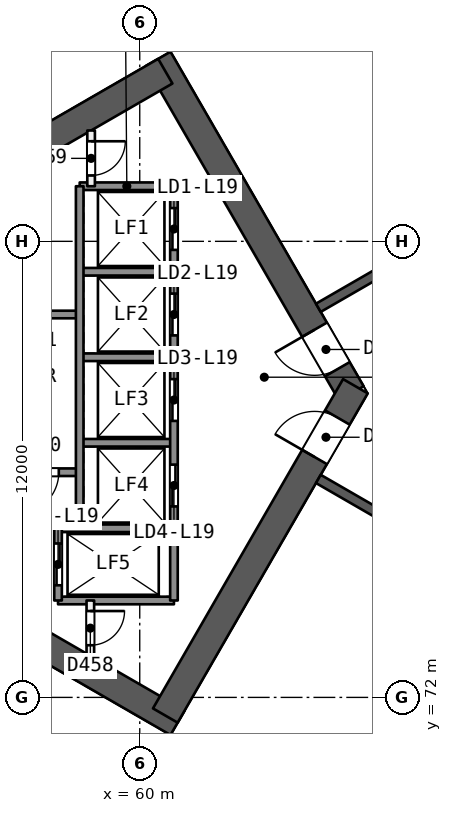
"""IFC4 building model, lengths in metres.
Left out: names, types, materials, properties, quantities, classifications, styles, units other than length and angle.
Written with IfcOpenShell. Run it as: python <this file> out.ifc"""

import sys

from ifc_helpers import new_model, si_unit, direction, frame, frame_2d, origin, place, context, subcontext, project, spatial, rectangle, extrude, element, fill, save


model = new_model("IFC4")
c1 = context("Model", 3, precision=1e-05, world=origin(), true_north=direction((0.0, 1.0)))
c2 = subcontext(c1, "Body", "Model", "MODEL_VIEW")
j1 = project(units=[si_unit("LENGTHUNIT", "METRE"), si_unit("PLANEANGLEUNIT", "RADIAN")], contexts=[c1])
p1 = place(None, origin())
s1 = spatial("IfcSite", under=j1, at=p1, CompositionType="ELEMENT")
p2 = place(p1, origin())
s2 = spatial("IfcBuilding", under=s1, at=p2, CompositionType="ELEMENT")
p3 = place(p2, frame((0.0, 0.0, 83.2)))
s3 = spatial("IfcBuildingStorey", under=s2, at=p3, CompositionType="ELEMENT", Elevation=83.2)
p4 = place(p3, frame((65.567, 80.0, 0.0), z_axis=(0.0, 0.0, 1.0), x_axis=(-0.499988615364, 0.866031976607, 0.0)))
e1 = element("IfcWall", 1, at=p4, inside=s3, PredefinedType="SHEAR", context=c2, shape_type="SweptSolid", body=[
    extrude(rectangle(XDim=10.163, YDim=0.75, at=frame_2d((5.082, 0.0))), origin(), (0.0, 0.0, 1.0), 3.7),
])
p5 = place(p4, frame((0.733, 0.0, 0.0)))
e2 = element("IfcOpeningElement", 2, at=p5, cuts=e1, PredefinedType="OPENING", context=c2, shape_type="SweptSolid", body=[
    extrude(rectangle(XDim=1.2, YDim=2.1, at=frame_2d((0.6, 1.05))), frame((0.0, 0.385, 0.0), z_axis=(0.0, -1.0, 0.0), x_axis=(1.0, 0.0, 0.0)), (0.0, 0.0, 1.0), 0.771),
])
p6 = place(p3, frame((60.673, 88.477, 0.0), z_axis=(0.0, 0.0, 1.0), x_axis=(-0.8660248072, -0.500001033313, 0.0)))
e3 = element("IfcWall", 3, at=p6, inside=s3, PredefinedType="SHEAR", context=c2, shape_type="SweptSolid", body=[
    extrude(rectangle(XDim=13.958, YDim=0.75, at=frame_2d((6.979, 0.0))), origin(), (0.0, 0.0, 1.0), 3.7),
])
p7 = place(p3, frame((48.772, 78.394, 0.0), z_axis=(0.0, 0.0, 1.0), x_axis=(0.866028339916, -0.499994914436, 0.0)))
e4 = element("IfcWall", 4, at=p7, inside=s3, PredefinedType="SHEAR", context=c2, shape_type="SweptSolid", body=[
    extrude(rectangle(XDim=14.117, YDim=0.75, at=frame_2d((7.059, 0.0))), origin(), (0.0, 0.0, 1.0), 3.7),
])
p8 = place(p3, frame((60.673, 71.523, 0.0), z_axis=(0.0, 0.0, 1.0), x_axis=(0.499997052475, 0.866027105532, 0.0)))
e5 = element("IfcWall", 5, at=p8, inside=s3, PredefinedType="SHEAR", context=c2, shape_type="SweptSolid", body=[
    extrude(rectangle(XDim=10.005, YDim=0.75, at=frame_2d((5.002, 0.0))), origin(), (0.0, 0.0, 1.0), 3.7),
])
p9 = place(p8, frame((7.855, 0.0, 0.0)))
e6 = element("IfcOpeningElement", 6, at=p9, cuts=e5, PredefinedType="OPENING", context=c2, shape_type="SweptSolid", body=[
    extrude(rectangle(XDim=1.2, YDim=2.1, at=frame_2d((0.6, 1.05))), frame((0.0, 0.385, 0.0), z_axis=(0.0, -1.0, 0.0), x_axis=(1.0, 0.0, 0.0)), (0.0, 0.0, 1.0), 0.771),
])
p10 = place(p3, frame((78.2, 90.046, 0.0), z_axis=(0.0, 0.0, 1.0), x_axis=(-0.866026492143, -0.499998114903, 0.0)))
e7 = element("IfcWall", 7, at=p10, inside=s3, PredefinedType="SHEAR", context=c2, shape_type="SweptSolid", body=[
    extrude(rectangle(XDim=15.588, YDim=0.25, at=frame_2d((7.794, 0.0))), origin(), (0.0, 0.0, 1.0), 3.2),
])
p11 = place(p10, frame((1.527, 0.0, 0.0)))
e8 = element("IfcOpeningElement", 8, at=p11, cuts=e7, PredefinedType="OPENING", context=c2, shape_type="SweptSolid", body=[
    extrude(rectangle(XDim=1.0, YDim=2.1, at=frame_2d((0.5, 1.05))), frame((0.0, 0.135, 0.0), z_axis=(0.0, -1.0, 0.0), x_axis=(1.0, 0.0, 0.0)), (0.0, 0.0, 1.0), 0.271),
])
p12 = place(p10, frame((8.227, 0.0, 0.0)))
e9 = element("IfcOpeningElement", 9, at=p12, cuts=e7, PredefinedType="OPENING", context=c2, shape_type="SweptSolid", body=[
    extrude(rectangle(XDim=1.1, YDim=2.1, at=frame_2d((0.55, 1.05))), frame((0.0, 0.135, 0.0), z_axis=(0.0, -1.0, 0.0), x_axis=(1.0, 0.0, 0.0)), (0.0, 0.0, 1.0), 0.271),
])
p13 = place(p10, frame((12.594, 0.0, 0.0)))
e10 = element("IfcOpeningElement", 10, at=p13, cuts=e7, PredefinedType="OPENING", context=c2, shape_type="SweptSolid", body=[
    extrude(rectangle(XDim=1.0, YDim=2.1, at=frame_2d((0.5, 1.05))), frame((0.0, 0.135, 0.0), z_axis=(0.0, -1.0, 0.0), x_axis=(1.0, 0.0, 0.0)), (0.0, 0.0, 1.0), 0.271),
])
p14 = place(p3, frame((64.7, 77.748, 0.0), z_axis=(0.0, 0.0, 1.0), x_axis=(0.866026492143, -0.499998114903, 0.0)))
e11 = element("IfcWall", 11, at=p14, inside=s3, PredefinedType="SHEAR", context=c2, shape_type="SweptSolid", body=[
    extrude(rectangle(XDim=15.588, YDim=0.25, at=frame_2d((7.794, 0.0))), origin(), (0.0, 0.0, 1.0), 3.2),
])
p15 = place(p14, frame((3.397, 0.0, 0.0)))
e12 = element("IfcOpeningElement", 12, at=p15, cuts=e11, PredefinedType="OPENING", context=c2, shape_type="SweptSolid", body=[
    extrude(rectangle(XDim=1.0, YDim=2.1, at=frame_2d((0.5, 1.05))), frame((0.0, 0.135, 0.0), z_axis=(0.0, -1.0, 0.0), x_axis=(1.0, 0.0, 0.0)), (0.0, 0.0, 1.0), 0.271),
])
p16 = place(p14, frame((9.091, 0.0, 0.0)))
e13 = element("IfcOpeningElement", 13, at=p16, cuts=e11, PredefinedType="OPENING", context=c2, shape_type="SweptSolid", body=[
    extrude(rectangle(XDim=1.0, YDim=2.1, at=frame_2d((0.5, 1.05))), frame((0.0, 0.135, 0.0), z_axis=(0.0, -1.0, 0.0), x_axis=(1.0, 0.0, 0.0)), (0.0, 0.0, 1.0), 0.271),
])
for number, where, z_axis, x_axis in (
    (14, (62.432, 96.157, 0.0), (0.0, 0.0, 1.0), (0.5, -0.866, 0.0)),
    (15, (64.862, 62.44, 0.0), (0.0, 0.0, 1.0), (0.5, 0.866, 0.0)),
):
    element("IfcWall", number, at=place(p3, frame(where, z_axis=z_axis, x_axis=x_axis)), inside=s3, PredefinedType="PARTITIONING", context=c2, shape_type="SweptSolid", body=[
        extrude(rectangle(XDim=13.177, YDim=0.2, at=frame_2d((6.588, 0.0))), origin(), (0.0, 0.0, 1.0), 3.2),
    ])
p17 = place(p3, frame((39.353, 83.005, 0.0), z_axis=(0.0, 0.0, 1.0), x_axis=(0.866025832118, 0.499999258104, 0.0)))
e16 = element("IfcWall", 16, at=p17, inside=s3, PredefinedType="SOLIDWALL", context=c2, shape_type="SweptSolid", body=[
    extrude(rectangle(XDim=58.737, YDim=0.3, at=frame_2d((29.368, 0.0))), origin(), (0.0, 0.0, 1.0), 3.2),
])
p18 = place(p17, frame((28.636, 0.0, 0.0)))
e17 = element("IfcOpeningElement", 17, at=p18, cuts=e16, PredefinedType="OPENING", context=c2, shape_type="SweptSolid", body=[
    extrude(rectangle(XDim=2.4, YDim=2.4, at=frame_2d((1.2, 1.2))), frame((0.0, 0.161, 0.0), z_axis=(0.0, -1.0, 0.0), x_axis=(1.0, 0.0, 0.0)), (0.0, 0.0, 1.0), 0.321),
])
p19 = place(p17, frame((33.936, 0.0, 0.0)))
e18 = element("IfcOpeningElement", 18, at=p19, cuts=e16, PredefinedType="OPENING", context=c2, shape_type="SweptSolid", body=[
    extrude(rectangle(XDim=2.4, YDim=2.4, at=frame_2d((1.2, 1.2))), frame((0.0, 0.161, 0.0), z_axis=(0.0, -1.0, 0.0), x_axis=(1.0, 0.0, 0.0)), (0.0, 0.0, 1.0), 0.321),
])
p20 = place(p17, frame((45.575, 0.0, 0.0)))
e19 = element("IfcOpeningElement", 19, at=p20, cuts=e16, PredefinedType="OPENING", context=c2, shape_type="SweptSolid", body=[
    extrude(rectangle(XDim=2.4, YDim=2.4, at=frame_2d((1.2, 1.2))), frame((0.0, 0.161, 0.0), z_axis=(0.0, -1.0, 0.0), x_axis=(1.0, 0.0, 0.0)), (0.0, 0.0, 1.0), 0.321),
])
p21 = place(p17, frame((22.868, 0.0, 0.0)))
e20 = element("IfcOpeningElement", 20, at=p21, cuts=e16, PredefinedType="OPENING", context=c2, shape_type="SweptSolid", body=[
    extrude(rectangle(XDim=2.4, YDim=2.4, at=frame_2d((1.2, 1.2))), frame((0.0, 0.161, 0.0), z_axis=(0.0, -1.0, 0.0), x_axis=(1.0, 0.0, 0.0)), (0.0, 0.0, 1.0), 0.321),
])
p22 = place(p17, frame((10.765, 0.0, 0.0)))
e21 = element("IfcOpeningElement", 21, at=p22, cuts=e16, PredefinedType="OPENING", context=c2, shape_type="SweptSolid", body=[
    extrude(rectangle(XDim=2.4, YDim=2.4, at=frame_2d((1.2, 1.2))), frame((0.0, 0.161, 0.0), z_axis=(0.0, -1.0, 0.0), x_axis=(1.0, 0.0, 0.0)), (0.0, 0.0, 1.0), 0.321),
])
p23 = place(p3, frame((90.221, 47.626, 0.0), z_axis=(0.0, 0.0, 1.0), x_axis=(-0.866025832118, 0.499999258104, 0.0)))
e22 = element("IfcWall", 22, at=p23, inside=s3, PredefinedType="SOLIDWALL", context=c2, shape_type="SweptSolid", body=[
    extrude(rectangle(XDim=58.737, YDim=0.3, at=frame_2d((29.368, 0.0))), origin(), (0.0, 0.0, 1.0), 3.2),
])
p24 = place(p23, frame((32.065, 0.0, 0.0)))
e23 = element("IfcOpeningElement", 23, at=p24, cuts=e22, PredefinedType="OPENING", context=c2, shape_type="SweptSolid", body=[
    extrude(rectangle(XDim=2.4, YDim=2.4, at=frame_2d((1.2, 1.2))), frame((0.0, 0.161, 0.0), z_axis=(0.0, -1.0, 0.0), x_axis=(1.0, 0.0, 0.0)), (0.0, 0.0, 1.0), 0.321),
])
p25 = place(p23, frame((45.575, 0.0, 0.0)))
e24 = element("IfcOpeningElement", 24, at=p25, cuts=e22, PredefinedType="OPENING", context=c2, shape_type="SweptSolid", body=[
    extrude(rectangle(XDim=2.4, YDim=2.4, at=frame_2d((1.2, 1.2))), frame((0.0, 0.161, 0.0), z_axis=(0.0, -1.0, 0.0), x_axis=(1.0, 0.0, 0.0)), (0.0, 0.0, 1.0), 0.321),
])
p26 = place(p23, frame((13.441, 0.0, 0.0)))
e25 = element("IfcOpeningElement", 25, at=p26, cuts=e22, PredefinedType="OPENING", context=c2, shape_type="SweptSolid", body=[
    extrude(rectangle(XDim=2.4, YDim=2.4, at=frame_2d((1.2, 1.2))), frame((0.0, 0.161, 0.0), z_axis=(0.0, -1.0, 0.0), x_axis=(1.0, 0.0, 0.0)), (0.0, 0.0, 1.0), 0.321),
])
for number, where, z_axis, x_axis in (
    (26, (60.9, 85.45, 0.0), (0.0, 0.0, 1.0), (-1.0, 0.0, 0.0)),
    (27, (60.9, 83.2, 0.0), (0.0, 0.0, 1.0), (-1.0, 0.0, 0.0)),
):
    element("IfcWall", number, at=place(p3, frame(where, z_axis=z_axis, x_axis=x_axis)), inside=s3, PredefinedType="SOLIDWALL", context=c2, shape_type="SweptSolid", body=[
        extrude(rectangle(XDim=2.48, YDim=0.2, at=frame_2d((1.24, 0.0))), origin(), (0.0, 0.0, 1.0), 3.2),
    ])
p27 = place(p3, frame((58.42, 82.075, 0.0), z_axis=(0.0, 0.0, 1.0), x_axis=(-1.0, 0.0, 0.0)))
e28 = element("IfcWall", 28, at=p27, inside=s3, PredefinedType="SOLIDWALL", context=c2, shape_type="SweptSolid", body=[
    extrude(rectangle(XDim=7.7, YDim=0.2, at=frame_2d((3.85, 0.0))), origin(), (0.0, 0.0, 1.0), 3.2),
])
for number, where, z_axis, x_axis in (
    (29, (60.9, 80.95, 0.0), (0.0, 0.0, 1.0), (-1.0, 0.0, 0.0)),
    (30, (60.9, 78.7, 0.0), (0.0, 0.0, 1.0), (-1.0, 0.0, 0.0)),
):
    element("IfcWall", number, at=place(p3, frame(where, z_axis=z_axis, x_axis=x_axis)), inside=s3, PredefinedType="SOLIDWALL", context=c2, shape_type="SweptSolid", body=[
        extrude(rectangle(XDim=2.48, YDim=0.2, at=frame_2d((1.24, 0.0))), origin(), (0.0, 0.0, 1.0), 3.2),
    ])
p28 = place(p3, frame((58.42, 77.925, 0.0), z_axis=(0.0, 0.0, 1.0), x_axis=(-1.0, 0.0, 0.0)))
e31 = element("IfcWall", 31, at=p28, inside=s3, PredefinedType="SOLIDWALL", context=c2, shape_type="SweptSolid", body=[
    extrude(rectangle(XDim=7.7, YDim=0.2, at=frame_2d((3.85, 0.0))), origin(), (0.0, 0.0, 1.0), 3.2),
])
p29 = place(p28, frame((0.55, 0.0, 0.0)))
e32 = element("IfcOpeningElement", 32, at=p29, cuts=e31, PredefinedType="OPENING", context=c2, shape_type="SweptSolid", body=[
    extrude(rectangle(XDim=1.1, YDim=2.1, at=frame_2d((0.55, 1.05))), frame((0.0, 0.11, 0.0), z_axis=(0.0, -1.0, 0.0), x_axis=(1.0, 0.0, 0.0)), (0.0, 0.0, 1.0), 0.221),
])
for number, where, z_axis, x_axis in (
    (33, (60.9, 76.45, 0.0), (0.0, 0.0, 1.0), (-1.0, 0.0, 0.0)),
    (34, (60.9, 74.55, 0.0), (0.0, 0.0, 1.0), (-1.0, 0.0, 0.0)),
):
    element("IfcWall", number, at=place(p3, frame(where, z_axis=z_axis, x_axis=x_axis)), inside=s3, PredefinedType="SOLIDWALL", context=c2, shape_type="SweptSolid", body=[
        extrude(rectangle(XDim=3.05, YDim=0.2, at=frame_2d((1.525, 0.0))), origin(), (0.0, 0.0, 1.0), 3.2),
    ])
p30 = place(p3, frame((60.9, 85.45, 0.0), z_axis=(0.0, 0.0, 1.0), x_axis=(0.0, -1.0, 0.0)))
e35 = element("IfcWall", 35, at=p30, inside=s3, PredefinedType="SOLIDWALL", context=c2, shape_type="SweptSolid", body=[
    extrude(rectangle(XDim=10.9, YDim=0.2, at=frame_2d((5.45, 0.0))), origin(), (0.0, 0.0, 1.0), 3.2),
])
p31 = place(p30, frame((0.575, 0.0, 0.0)))
e36 = element("IfcOpeningElement", 36, at=p31, cuts=e35, PredefinedType="OPENING", context=c2, shape_type="SweptSolid", body=[
    extrude(rectangle(XDim=1.1, YDim=2.1, at=frame_2d((0.55, 1.05))), frame((0.0, 0.11, 0.0), z_axis=(0.0, -1.0, 0.0), x_axis=(1.0, 0.0, 0.0)), (0.0, 0.0, 1.0), 0.221),
])
p32 = place(p30, frame((2.825, 0.0, 0.0)))
e37 = element("IfcOpeningElement", 37, at=p32, cuts=e35, PredefinedType="OPENING", context=c2, shape_type="SweptSolid", body=[
    extrude(rectangle(XDim=1.1, YDim=2.1, at=frame_2d((0.55, 1.05))), frame((0.0, 0.11, 0.0), z_axis=(0.0, -1.0, 0.0), x_axis=(1.0, 0.0, 0.0)), (0.0, 0.0, 1.0), 0.221),
])
p33 = place(p30, frame((5.075, 0.0, 0.0)))
e38 = element("IfcOpeningElement", 38, at=p33, cuts=e35, PredefinedType="OPENING", context=c2, shape_type="SweptSolid", body=[
    extrude(rectangle(XDim=1.1, YDim=2.1, at=frame_2d((0.55, 1.05))), frame((0.0, 0.11, 0.0), z_axis=(0.0, -1.0, 0.0), x_axis=(1.0, 0.0, 0.0)), (0.0, 0.0, 1.0), 0.221),
])
p34 = place(p30, frame((7.325, 0.0, 0.0)))
e39 = element("IfcOpeningElement", 39, at=p34, cuts=e35, PredefinedType="OPENING", context=c2, shape_type="SweptSolid", body=[
    extrude(rectangle(XDim=1.1, YDim=2.1, at=frame_2d((0.55, 1.05))), frame((0.0, 0.11, 0.0), z_axis=(0.0, -1.0, 0.0), x_axis=(1.0, 0.0, 0.0)), (0.0, 0.0, 1.0), 0.221),
])
p35 = place(p3, frame((58.72, 86.917, 0.0), z_axis=(0.0, 0.0, 1.0), x_axis=(0.0, -1.0, 0.0)))
e40 = element("IfcWall", 40, at=p35, inside=s3, PredefinedType="PARTITIONING", context=c2, shape_type="SweptSolid", body=[
    extrude(rectangle(XDim=1.467, YDim=0.2, at=frame_2d((0.733, 0.0))), origin(), (0.0, 0.0, 1.0), 3.2),
])
p36 = place(p35, frame((0.283, 0.0, 0.0)))
e41 = element("IfcOpeningElement", 41, at=p36, cuts=e40, PredefinedType="OPENING", context=c2, shape_type="SweptSolid", body=[
    extrude(rectangle(XDim=0.9, YDim=2.1, at=frame_2d((0.45, 1.05))), frame((0.0, 0.11, 0.0), z_axis=(0.0, -1.0, 0.0), x_axis=(1.0, 0.0, 0.0)), (0.0, 0.0, 1.0), 0.221),
])
p37 = place(p3, frame((58.7, 74.55, 0.0), z_axis=(0.0, 0.0, 1.0), x_axis=(0.0, -1.0, 0.0)))
e42 = element("IfcWall", 42, at=p37, inside=s3, PredefinedType="PARTITIONING", context=c2, shape_type="SweptSolid", body=[
    extrude(rectangle(XDim=1.455, YDim=0.2, at=frame_2d((0.728, 0.0))), origin(), (0.0, 0.0, 1.0), 3.2),
])
p38 = place(p37, frame((0.278, 0.0, 0.0)))
e43 = element("IfcOpeningElement", 43, at=p38, cuts=e42, PredefinedType="OPENING", context=c2, shape_type="SweptSolid", body=[
    extrude(rectangle(XDim=0.9, YDim=2.1, at=frame_2d((0.45, 1.05))), frame((0.0, 0.11, 0.0), z_axis=(0.0, -1.0, 0.0), x_axis=(1.0, 0.0, 0.0)), (0.0, 0.0, 1.0), 0.221),
])
p39 = place(p3, frame((58.42, 85.45, 0.0), z_axis=(0.0, 0.0, 1.0), x_axis=(0.0, -1.0, 0.0)))
e44 = element("IfcWall", 44, at=p39, inside=s3, PredefinedType="SOLIDWALL", context=c2, shape_type="SweptSolid", body=[
    extrude(rectangle(XDim=9.0, YDim=0.2, at=frame_2d((4.5, 0.0))), origin(), (0.0, 0.0, 1.0), 3.2),
])
p40 = place(p3, frame((57.85, 76.45, 0.0), z_axis=(0.0, 0.0, 1.0), x_axis=(0.0, -1.0, 0.0)))
e45 = element("IfcWall", 45, at=p40, inside=s3, PredefinedType="SOLIDWALL", context=c2, shape_type="SweptSolid", body=[
    extrude(rectangle(XDim=1.9, YDim=0.2, at=frame_2d((0.95, 0.0))), origin(), (0.0, 0.0, 1.0), 3.2),
])
p41 = place(p40, frame((0.4, 0.0, 0.0)))
e46 = element("IfcOpeningElement", 46, at=p41, cuts=e45, PredefinedType="OPENING", context=c2, shape_type="SweptSolid", body=[
    extrude(rectangle(XDim=1.1, YDim=2.1, at=frame_2d((0.55, 1.05))), frame((0.0, 0.11, 0.0), z_axis=(0.0, -1.0, 0.0), x_axis=(1.0, 0.0, 0.0)), (0.0, 0.0, 1.0), 0.221),
])
p42 = place(p5, origin())
e47 = element("IfcDoor", 47, at=p42, inside=s3, OperationType="SINGLE_SWING_RIGHT", PredefinedType="NOTDEFINED", context=c2, shape_type="SweptSolid", body=[
    extrude(rectangle(XDim=1.2, YDim=2.1, at=frame_2d((0.6, 1.05))), frame((0.0, 0.025, 0.0), z_axis=(0.0, -1.0, 0.0), x_axis=(1.0, 0.0, 0.0)), (0.0, 0.0, 1.0), 0.05),
])
fill(e2, e47)
p43 = place(p9, origin())
e48 = element("IfcDoor", 48, at=p43, inside=s3, OperationType="SINGLE_SWING_LEFT", PredefinedType="NOTDEFINED", context=c2, shape_type="SweptSolid", body=[
    extrude(rectangle(XDim=1.2, YDim=2.1, at=frame_2d((0.6, 1.05))), frame((0.0, 0.025, 0.0), z_axis=(0.0, -1.0, 0.0), x_axis=(1.0, 0.0, 0.0)), (0.0, 0.0, 1.0), 0.05),
])
fill(e6, e48)
p44 = place(p31, origin())
e49 = element("IfcDoor", 49, at=p44, inside=s3, OperationType="SLIDING_TO_RIGHT", PredefinedType="NOTDEFINED", context=c2, shape_type="SweptSolid", body=[
    extrude(rectangle(XDim=1.1, YDim=2.1, at=frame_2d((0.55, 1.05))), frame((0.0, 0.025, 0.0), z_axis=(0.0, -1.0, 0.0), x_axis=(1.0, 0.0, 0.0)), (0.0, 0.0, 1.0), 0.05),
])
fill(e36, e49)
p45 = place(p32, origin())
e50 = element("IfcDoor", 50, at=p45, inside=s3, OperationType="SLIDING_TO_LEFT", PredefinedType="NOTDEFINED", context=c2, shape_type="SweptSolid", body=[
    extrude(rectangle(XDim=1.1, YDim=2.1, at=frame_2d((0.55, 1.05))), frame((0.0, 0.025, 0.0), z_axis=(0.0, -1.0, 0.0), x_axis=(1.0, 0.0, 0.0)), (0.0, 0.0, 1.0), 0.05),
])
fill(e37, e50)
p46 = place(p33, origin())
e51 = element("IfcDoor", 51, at=p46, inside=s3, OperationType="SLIDING_TO_RIGHT", PredefinedType="NOTDEFINED", context=c2, shape_type="SweptSolid", body=[
    extrude(rectangle(XDim=1.1, YDim=2.1, at=frame_2d((0.55, 1.05))), frame((0.0, 0.025, 0.0), z_axis=(0.0, -1.0, 0.0), x_axis=(1.0, 0.0, 0.0)), (0.0, 0.0, 1.0), 0.05),
])
fill(e38, e51)
p47 = place(p34, origin())
e52 = element("IfcDoor", 52, at=p47, inside=s3, OperationType="SLIDING_TO_LEFT", PredefinedType="NOTDEFINED", context=c2, shape_type="SweptSolid", body=[
    extrude(rectangle(XDim=1.1, YDim=2.1, at=frame_2d((0.55, 1.05))), frame((0.0, 0.025, 0.0), z_axis=(0.0, -1.0, 0.0), x_axis=(1.0, 0.0, 0.0)), (0.0, 0.0, 1.0), 0.05),
])
fill(e39, e52)
p48 = place(p41, origin())
e53 = element("IfcDoor", 53, at=p48, inside=s3, OperationType="SLIDING_TO_RIGHT", PredefinedType="NOTDEFINED", context=c2, shape_type="SweptSolid", body=[
    extrude(rectangle(XDim=1.1, YDim=2.1, at=frame_2d((0.55, 1.05))), frame((0.0, 0.025, 0.0), z_axis=(0.0, -1.0, 0.0), x_axis=(1.0, 0.0, 0.0)), (0.0, 0.0, 1.0), 0.05),
])
fill(e46, e53)
p49 = place(p38, origin())
e54 = element("IfcDoor", 54, at=p49, inside=s3, OperationType="SINGLE_SWING_LEFT", PredefinedType="NOTDEFINED", context=c2, shape_type="SweptSolid", body=[
    extrude(rectangle(XDim=0.9, YDim=2.1, at=frame_2d((0.45, 1.05))), frame((0.0, 0.025, 0.0), z_axis=(0.0, -1.0, 0.0), x_axis=(1.0, 0.0, 0.0)), (0.0, 0.0, 1.0), 0.05),
])
fill(e43, e54)
p50 = place(p36, origin())
e55 = element("IfcDoor", 55, at=p50, inside=s3, OperationType="SINGLE_SWING_LEFT", PredefinedType="NOTDEFINED", context=c2, shape_type="SweptSolid", body=[
    extrude(rectangle(XDim=0.9, YDim=2.1, at=frame_2d((0.45, 1.05))), frame((0.0, 0.025, 0.0), z_axis=(0.0, -1.0, 0.0), x_axis=(1.0, 0.0, 0.0)), (0.0, 0.0, 1.0), 0.05),
])
fill(e41, e55)
p51 = place(p29, origin())
e56 = element("IfcDoor", 56, at=p51, inside=s3, OperationType="SINGLE_SWING_RIGHT", PredefinedType="NOTDEFINED", context=c2, shape_type="SweptSolid", body=[
    extrude(rectangle(XDim=1.1, YDim=2.1, at=frame_2d((0.55, 1.05))), frame((0.0, 0.025, 0.0), z_axis=(0.0, -1.0, 0.0), x_axis=(1.0, 0.0, 0.0)), (0.0, 0.0, 1.0), 0.05),
])
fill(e32, e56)
save(model, sys.argv[1])
